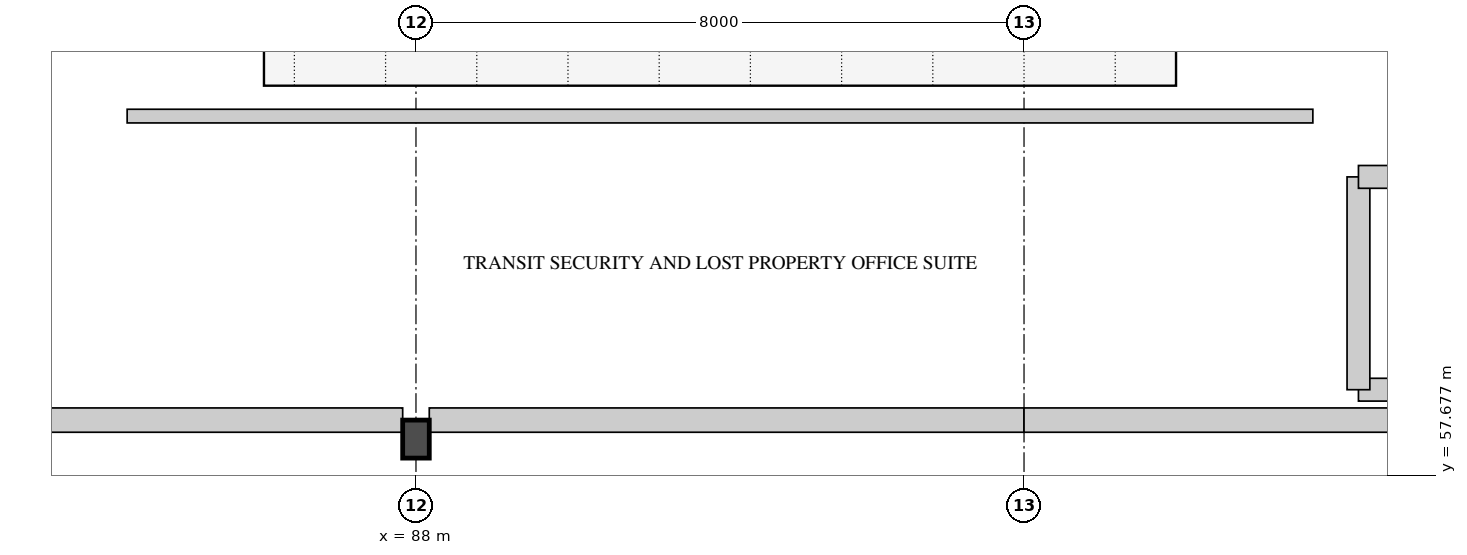
"""IFC4 building model, lengths in metres.
Left out: names, types, materials, properties, quantities, classifications, styles, units other than length and angle.
Written with IfcOpenShell. Run it as: python <this file> out.ifc"""

import sys

from ifc_helpers import new_model, si_unit, direction, frame, frame_2d, origin, origin_2d, place, context, subcontext, project, spatial, rectangle, extrude, element, fill, save


model = new_model("IFC4")
c1 = context("Model", 3, precision=1e-05, world=origin(), true_north=direction((0.0, 1.0)))
c2 = subcontext(c1, "Body", "Model", "MODEL_VIEW")
j1 = project(units=[si_unit("LENGTHUNIT", "METRE"), si_unit("PLANEANGLEUNIT", "RADIAN")], contexts=[c1])
p1 = place(None, origin())
s1 = spatial("IfcSite", under=j1, at=p1, CompositionType="ELEMENT")
p2 = place(p1, origin())
s2 = spatial("IfcBuilding", under=s1, at=p2, CompositionType="ELEMENT")
p3 = place(p2, frame((0.0, 0.0, 4.8)))
s3 = spatial("IfcBuildingStorey", under=s2, at=p3, CompositionType="ELEMENT", Elevation=4.8)
p4 = place(p3, frame((88.0, 58.15, 0.0), z_axis=(0.0, 0.0, 1.0), x_axis=(1.0, 0.0, 0.0)))
e1 = element("IfcColumn", 1, at=p4, inside=s3, PredefinedType="PILASTER", context=c2, shape_type="SweptSolid", body=[
    extrude(rectangle(XDim=0.35, YDim=0.5, at=origin_2d()), origin(), (0.0, 0.0, 1.0), 4.8),
])
p5 = place(p3, frame((87.825, 58.4, 0.0), z_axis=(0.0, 0.0, 1.0), x_axis=(-1.0, 0.0, 0.0)))
e2 = element("IfcWall", 2, at=p5, inside=s3, PredefinedType="STANDARD", context=c2, shape_type="SweptSolid", body=[
    extrude(rectangle(XDim=7.825, YDim=0.32, at=frame_2d((3.913, 0.0))), origin(), (0.0, 0.0, 1.0), 4.475),
])
p6 = place(p5, frame((1.478, 0.0, 0.75)))
e3 = element("IfcOpeningElement", 3, at=p6, cuts=e2, PredefinedType="OPENING", context=c2, shape_type="SweptSolid", body=[
    extrude(rectangle(XDim=0.8, YDim=2.05, at=frame_2d((0.4, 1.025))), frame((0.0, 0.17, 0.0), z_axis=(0.0, -1.0, 0.0), x_axis=(1.0, 0.0, 0.0)), (0.0, 0.0, 1.0), 0.34),
])
p7 = place(p5, frame((3.052, 0.0, 0.75)))
e4 = element("IfcOpeningElement", 4, at=p7, cuts=e2, PredefinedType="OPENING", context=c2, shape_type="SweptSolid", body=[
    extrude(rectangle(XDim=1.722, YDim=1.6, at=frame_2d((0.861, 0.8))), frame((0.0, 0.17, 0.0), z_axis=(0.0, -1.0, 0.0), x_axis=(1.0, 0.0, 0.0)), (0.0, 0.0, 1.0), 0.34),
])
p8 = place(p5, frame((5.522, 0.0, 0.75)))
e5 = element("IfcOpeningElement", 5, at=p8, cuts=e2, PredefinedType="OPENING", context=c2, shape_type="SweptSolid", body=[
    extrude(rectangle(XDim=0.85, YDim=2.4, at=frame_2d((0.425, 1.2))), frame((0.0, 0.17, 0.0), z_axis=(0.0, -1.0, 0.0), x_axis=(1.0, 0.0, 0.0)), (0.0, 0.0, 1.0), 0.34),
])
p9 = place(p3, frame((96.0, 58.4, 0.0), z_axis=(0.0, 0.0, 1.0), x_axis=(-1.0, 0.0, 0.0)))
e6 = element("IfcWall", 6, at=p9, inside=s3, PredefinedType="STANDARD", context=c2, shape_type="SweptSolid", body=[
    extrude(rectangle(XDim=7.825, YDim=0.32, at=frame_2d((3.913, 0.0))), origin(), (0.0, 0.0, 1.0), 4.475),
])
p10 = place(p9, frame((1.328, 0.0, 0.75)))
e7 = element("IfcOpeningElement", 7, at=p10, cuts=e6, PredefinedType="OPENING", context=c2, shape_type="SweptSolid", body=[
    extrude(rectangle(XDim=1.1, YDim=2.2, at=frame_2d((0.55, 1.1))), frame((0.0, 0.17, 0.0), z_axis=(0.0, -1.0, 0.0), x_axis=(1.0, 0.0, 0.0)), (0.0, 0.0, 1.0), 0.34),
])
p11 = place(p9, frame((3.052, 0.0, 0.75)))
e8 = element("IfcOpeningElement", 8, at=p11, cuts=e6, PredefinedType="OPENING", context=c2, shape_type="SweptSolid", body=[
    extrude(rectangle(XDim=1.722, YDim=1.4, at=frame_2d((0.861, 0.7))), frame((0.0, 0.17, 0.0), z_axis=(0.0, -1.0, 0.0), x_axis=(1.0, 0.0, 0.0)), (0.0, 0.0, 1.0), 0.34),
])
p12 = place(p9, frame((5.472, 0.0, 0.75)))
e9 = element("IfcOpeningElement", 9, at=p12, cuts=e6, PredefinedType="OPENING", context=c2, shape_type="SweptSolid", body=[
    extrude(rectangle(XDim=0.95, YDim=2.6, at=frame_2d((0.475, 1.3))), frame((0.0, 0.17, 0.0), z_axis=(0.0, -1.0, 0.0), x_axis=(1.0, 0.0, 0.0)), (0.0, 0.0, 1.0), 0.34),
])
p13 = place(p3, frame((103.825, 58.4, 0.0), z_axis=(0.0, 0.0, 1.0), x_axis=(-1.0, 0.0, 0.0)))
e10 = element("IfcWall", 10, at=p13, inside=s3, PredefinedType="STANDARD", context=c2, shape_type="SweptSolid", body=[
    extrude(rectangle(XDim=7.825, YDim=0.32, at=frame_2d((3.913, 0.0))), origin(), (0.0, 0.0, 1.0), 4.475),
])
p14 = place(p13, frame((1.228, 0.0, 0.75)))
e11 = element("IfcOpeningElement", 11, at=p14, cuts=e10, PredefinedType="OPENING", context=c2, shape_type="SweptSolid", body=[
    extrude(rectangle(XDim=1.3, YDim=2.45, at=frame_2d((0.65, 1.225))), frame((0.0, 0.17, 0.0), z_axis=(0.0, -1.0, 0.0), x_axis=(1.0, 0.0, 0.0)), (0.0, 0.0, 1.0), 0.34),
])
p15 = place(p13, frame((3.052, 0.0, 0.75)))
e12 = element("IfcOpeningElement", 12, at=p15, cuts=e10, PredefinedType="OPENING", context=c2, shape_type="SweptSolid", body=[
    extrude(rectangle(XDim=1.722, YDim=2.2, at=frame_2d((0.861, 1.1))), frame((0.0, 0.17, 0.0), z_axis=(0.0, -1.0, 0.0), x_axis=(1.0, 0.0, 0.0)), (0.0, 0.0, 1.0), 0.34),
])
p16 = place(p13, frame((5.422, 0.0, 0.75)))
e13 = element("IfcOpeningElement", 13, at=p16, cuts=e10, PredefinedType="OPENING", context=c2, shape_type="SweptSolid", body=[
    extrude(rectangle(XDim=1.05, YDim=2.5, at=frame_2d((0.525, 1.25))), frame((0.0, 0.17, 0.0), z_axis=(0.0, -1.0, 0.0), x_axis=(1.0, 0.0, 0.0)), (0.0, 0.0, 1.0), 0.34),
])
for number, where, z_axis, x_axis in (
    (14, (103.2, 58.8, 0.0), (0.0, 0.0, 1.0), (-1.0, 0.0, 0.0)),
    (15, (100.4, 58.8, 0.0), (0.0, 0.0, 1.0), (0.0, 1.0, 0.0)),
):
    element("IfcWall", number, at=place(p3, frame(where, z_axis=z_axis, x_axis=x_axis)), inside=s3, PredefinedType="SHEAR", context=c2, shape_type="SweptSolid", body=[
        extrude(rectangle(XDim=2.8, YDim=0.3, at=frame_2d((1.4, 0.0))), origin(), (0.0, 0.0, 1.0), 4.5),
    ])
p17 = place(p3, frame((100.4, 61.6, 0.0), z_axis=(0.0, 0.0, 1.0), x_axis=(1.0, 0.0, 0.0)))
e16 = element("IfcWall", 16, at=p17, inside=s3, PredefinedType="SHEAR", context=c2, shape_type="SweptSolid", body=[
    extrude(rectangle(XDim=2.8, YDim=0.3, at=frame_2d((1.4, 0.0))), origin(), (0.0, 0.0, 1.0), 4.5),
])
p18 = place(p17, frame((0.85, 0.0, 0.0)))
e17 = element("IfcOpeningElement", 17, at=p18, cuts=e16, PredefinedType="OPENING", context=c2, shape_type="SweptSolid", body=[
    extrude(rectangle(XDim=1.1, YDim=2.2, at=frame_2d((0.55, 1.1))), frame((0.0, 0.16, 0.0), z_axis=(0.0, -1.0, 0.0), x_axis=(1.0, 0.0, 0.0)), (0.0, 0.0, 1.0), 0.32),
])
p19 = place(p3, frame((84.2, 62.4, 0.0), z_axis=(0.0, 0.0, 1.0), x_axis=(1.0, 0.0, 0.0)))
e18 = element("IfcWall", 18, at=p19, inside=s3, PredefinedType="PARTITIONING", context=c2, shape_type="SweptSolid", body=[
    extrude(rectangle(XDim=15.6, YDim=0.18, at=frame_2d((7.8, 0.0))), origin(), (0.0, 0.0, 1.0), 3.54),
])
p20 = place(p19, frame((5.0, 0.0, 0.0)))
e19 = element("IfcOpeningElement", 19, at=p20, cuts=e18, PredefinedType="OPENING", context=c2, shape_type="SweptSolid", body=[
    extrude(rectangle(XDim=0.88, YDim=2.12, at=frame_2d((0.44, 1.06))), frame((0.0, 0.1, 0.0), z_axis=(0.0, -1.0, 0.0), x_axis=(1.0, 0.0, 0.0)), (0.0, 0.0, 1.0), 0.2),
])
p21 = place(p6, origin())
e20 = element("IfcWindow", 20, at=p21, inside=s3, PartitioningType="SINGLE_PANEL", PredefinedType="WINDOW", context=c2, shape_type="SweptSolid", body=[
    extrude(rectangle(XDim=0.8, YDim=2.05, at=frame_2d((0.4, 1.025))), frame((0.0, 0.03, 0.0), z_axis=(0.0, -1.0, 0.0), x_axis=(1.0, 0.0, 0.0)), (0.0, 0.0, 1.0), 0.06),
])
fill(e3, e20)
p22 = place(p7, origin())
e21 = element("IfcWindow", 21, at=p22, inside=s3, PartitioningType="SINGLE_PANEL", PredefinedType="WINDOW", context=c2, shape_type="SweptSolid", body=[
    extrude(rectangle(XDim=1.722, YDim=1.6, at=frame_2d((0.861, 0.8))), frame((0.0, 0.03, 0.0), z_axis=(0.0, -1.0, 0.0), x_axis=(1.0, 0.0, 0.0)), (0.0, 0.0, 1.0), 0.06),
])
fill(e4, e21)
p23 = place(p10, origin())
e22 = element("IfcWindow", 22, at=p23, inside=s3, PartitioningType="SINGLE_PANEL", PredefinedType="WINDOW", context=c2, shape_type="SweptSolid", body=[
    extrude(rectangle(XDim=1.1, YDim=2.2, at=frame_2d((0.55, 1.1))), frame((0.0, 0.03, 0.0), z_axis=(0.0, -1.0, 0.0), x_axis=(1.0, 0.0, 0.0)), (0.0, 0.0, 1.0), 0.06),
])
fill(e7, e22)
p24 = place(p11, origin())
e23 = element("IfcWindow", 23, at=p24, inside=s3, PartitioningType="SINGLE_PANEL", PredefinedType="WINDOW", context=c2, shape_type="SweptSolid", body=[
    extrude(rectangle(XDim=1.722, YDim=1.4, at=frame_2d((0.861, 0.7))), frame((0.0, 0.03, 0.0), z_axis=(0.0, -1.0, 0.0), x_axis=(1.0, 0.0, 0.0)), (0.0, 0.0, 1.0), 0.06),
])
fill(e8, e23)
p25 = place(p12, origin())
e24 = element("IfcWindow", 24, at=p25, inside=s3, PartitioningType="SINGLE_PANEL", PredefinedType="WINDOW", context=c2, shape_type="SweptSolid", body=[
    extrude(rectangle(XDim=0.95, YDim=2.6, at=frame_2d((0.475, 1.3))), frame((0.0, 0.03, 0.0), z_axis=(0.0, -1.0, 0.0), x_axis=(1.0, 0.0, 0.0)), (0.0, 0.0, 1.0), 0.06),
])
fill(e9, e24)
p26 = place(p15, origin())
e25 = element("IfcWindow", 25, at=p26, inside=s3, PartitioningType="SINGLE_PANEL", PredefinedType="WINDOW", context=c2, shape_type="SweptSolid", body=[
    extrude(rectangle(XDim=1.722, YDim=2.2, at=frame_2d((0.861, 1.1))), frame((0.0, 0.03, 0.0), z_axis=(0.0, -1.0, 0.0), x_axis=(1.0, 0.0, 0.0)), (0.0, 0.0, 1.0), 0.06),
])
fill(e12, e25)
p27 = place(p16, origin())
e26 = element("IfcWindow", 26, at=p27, inside=s3, PartitioningType="SINGLE_PANEL", PredefinedType="WINDOW", context=c2, shape_type="SweptSolid", body=[
    extrude(rectangle(XDim=1.05, YDim=2.5, at=frame_2d((0.525, 1.25))), frame((0.0, 0.03, 0.0), z_axis=(0.0, -1.0, 0.0), x_axis=(1.0, 0.0, 0.0)), (0.0, 0.0, 1.0), 0.06),
])
fill(e13, e26)
p28 = place(p20, origin())
e27 = element("IfcDoor", 27, at=p28, inside=s3, OperationType="SINGLE_SWING_LEFT", PredefinedType="DOOR", context=c2, shape_type="SweptSolid", body=[
    extrude(rectangle(XDim=0.88, YDim=2.12, at=frame_2d((0.44, 1.06))), frame((0.0, 0.025, 0.0), z_axis=(0.0, -1.0, 0.0), x_axis=(1.0, 0.0, 0.0)), (0.0, 0.0, 1.0), 0.05),
])
fill(e19, e27)
save(model, sys.argv[1])
